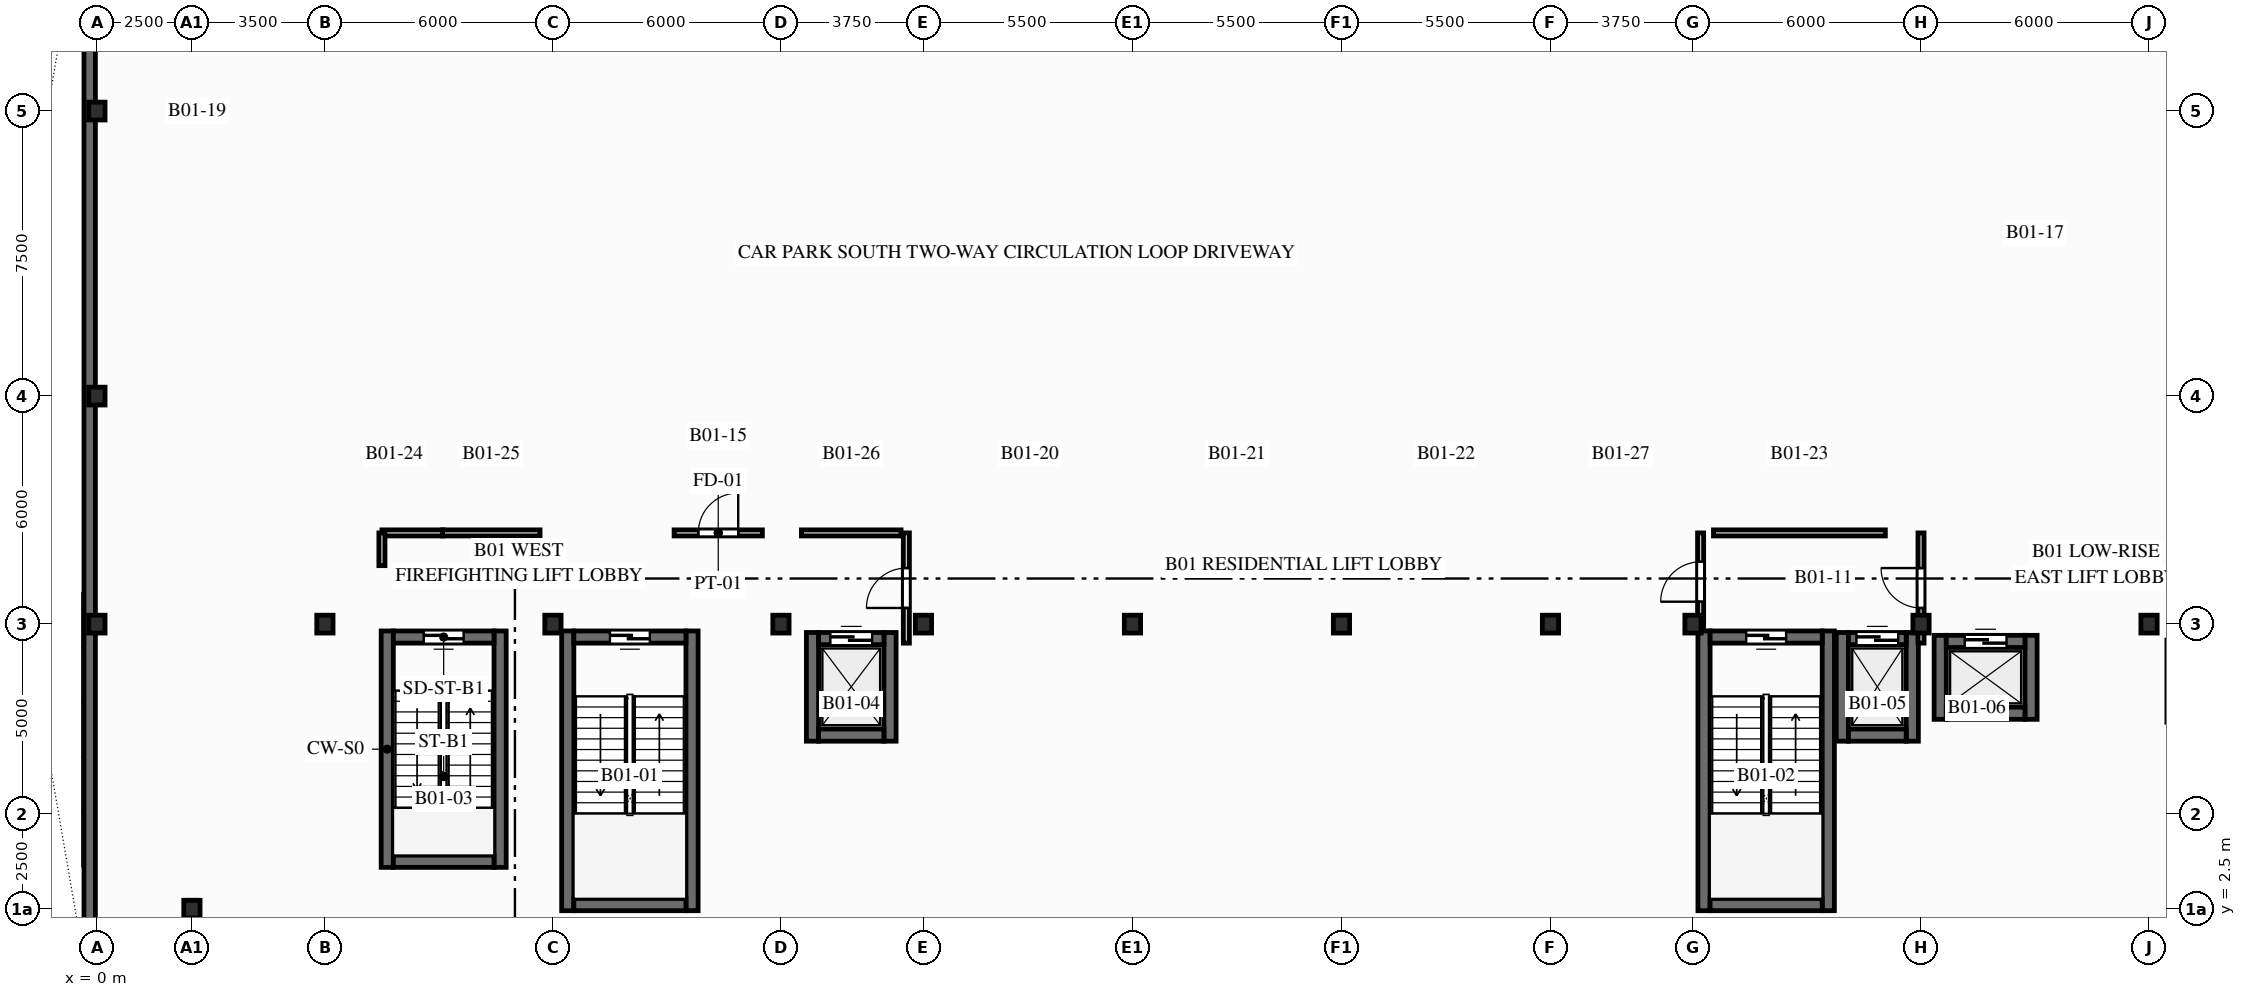
"""IFC4 building model, lengths in metres.
Left out: names, types, materials, properties, quantities, classifications, styles, units other than length and angle.
Written with IfcOpenShell. Run it as: python <this file> out.ifc"""

import sys

from ifc_helpers import new_model, si_unit, direction, frame, frame_2d, origin, origin_2d, place, context, subcontext, project, spatial, rectangle, i_section, extrude, element, fill, save


model = new_model("IFC4")
c1 = context("Model", 3, precision=1e-05, world=origin(), true_north=direction((0.0, 1.0)))
c2 = subcontext(c1, "Body", "Model", "MODEL_VIEW")
j1 = project(units=[si_unit("LENGTHUNIT", "METRE"), si_unit("PLANEANGLEUNIT", "RADIAN")], contexts=[c1])
p1 = place(None, origin())
s1 = spatial("IfcSite", under=j1, at=p1, CompositionType="ELEMENT")
p2 = place(p1, origin())
s2 = spatial("IfcBuilding", under=s1, at=p2, CompositionType="ELEMENT")
p3 = place(p2, frame((0.0, 0.0, -4.2)))
s3 = spatial("IfcBuildingStorey", under=s2, at=p3, CompositionType="ELEMENT", Elevation=-4.2)
for number, where, z_axis, x_axis in (
    (1, (0.0, 10.0, 0.0), (0.0, 0.0, 1.0), (1.0, 0.0, 0.0)),
    (2, (0.0, 16.0, 0.0), (0.0, 0.0, 1.0), (1.0, 0.0, 0.0)),
    (3, (0.0, 23.5, 0.0), (0.0, 0.0, 1.0), (1.0, 0.0, 0.0)),
    (4, (2.5, 2.5, 0.0), (0.0, 0.0, 1.0), (1.0, 0.0, 0.0)),
    (5, (6.0, 10.0, 0.0), (0.0, 0.0, 1.0), (1.0, 0.0, 0.0)),
    (6, (12.0, 10.0, 0.0), (0.0, 0.0, 1.0), (1.0, 0.0, 0.0)),
    (7, (18.0, 10.0, 0.0), (0.0, 0.0, 1.0), (1.0, 0.0, 0.0)),
    (8, (21.75, 10.0, 0.0), (0.0, 0.0, 1.0), (1.0, 0.0, 0.0)),
    (9, (27.25, 10.0, 0.0), (0.0, 0.0, 1.0), (1.0, 0.0, 0.0)),
    (10, (32.75, 10.0, 0.0), (0.0, 0.0, 1.0), (1.0, 0.0, 0.0)),
    (11, (38.25, 10.0, 0.0), (0.0, 0.0, 1.0), (1.0, 0.0, 0.0)),
    (12, (42.0, 10.0, 0.0), (0.0, 0.0, 1.0), (1.0, 0.0, 0.0)),
    (13, (48.0, 10.0, 0.0), (0.0, 0.0, 1.0), (1.0, 0.0, 0.0)),
    (14, (54.0, 10.0, 0.0), (0.0, 0.0, 1.0), (1.0, 0.0, 0.0)),
):
    element("IfcColumn", number, at=place(p3, frame(where, z_axis=z_axis, x_axis=x_axis)), inside=s3, PredefinedType="COLUMN", context=c2, shape_type="SweptSolid", body=[
        extrude(i_section(OverallWidth=0.428, OverallDepth=0.469, WebThickness=0.078, FlangeThickness=0.125, FilletRadius=0.015, at=origin_2d()), origin(), (0.0, 0.0, 1.0), 4.2),
    ])
p4 = place(p3, frame((-0.19, 1.2, 0.0), z_axis=(0.0, 0.0, 1.0), x_axis=(0.0, 1.0, 0.0)))
e15 = element("IfcWall", 15, at=p4, inside=s3, PredefinedType="SHEAR", context=c2, shape_type="SweptSolid", body=[
    extrude(rectangle(XDim=27.84, YDim=0.3, at=frame_2d((13.92, 0.0))), origin(), (0.0, 0.0, 1.0), 3.86),
])
for number, where, z_axis, x_axis in (
    (16, (12.39, 2.46, 0.0), (0.0, 0.0, 1.0), (0.0, 1.0, 0.0)),
    (17, (15.66, 2.46, 0.0), (0.0, 0.0, 1.0), (0.0, 1.0, 0.0)),
):
    element("IfcWall", number, at=place(p3, frame(where, z_axis=z_axis, x_axis=x_axis)), inside=s3, PredefinedType="SHEAR", context=c2, shape_type="SweptSolid", body=[
        extrude(rectangle(XDim=7.36, YDim=0.32, at=frame_2d((3.68, 0.0))), origin(), (0.0, 0.0, 1.0), 3.86),
    ])
p5 = place(p3, frame((12.55, 2.62, 0.0), z_axis=(0.0, 0.0, 1.0), x_axis=(1.0, 0.0, 0.0)))
e18 = element("IfcWall", 18, at=p5, inside=s3, PredefinedType="SHEAR", context=c2, shape_type="SweptSolid", body=[
    extrude(rectangle(XDim=2.95, YDim=0.32, at=frame_2d((1.475, 0.0))), origin(), (0.0, 0.0, 1.0), 3.86),
])
p6 = place(p3, frame((15.5, 9.66, 0.0), z_axis=(0.0, 0.0, 1.0), x_axis=(-1.0, 0.0, 0.0)))
e19 = element("IfcWall", 19, at=p6, inside=s3, PredefinedType="SHEAR", context=c2, shape_type="SweptSolid", body=[
    extrude(rectangle(XDim=2.95, YDim=0.32, at=frame_2d((1.475, 0.0))), origin(), (0.0, 0.0, 1.0), 3.86),
])
p7 = place(p6, frame((0.95, 0.0, 0.0)))
e20 = element("IfcOpeningElement", 20, at=p7, cuts=e19, PredefinedType="OPENING", context=c2, shape_type="SweptSolid", body=[
    extrude(rectangle(XDim=1.05, YDim=2.06, at=frame_2d((0.525, 1.03))), frame((0.0, 0.17, 0.0), z_axis=(0.0, -1.0, 0.0), x_axis=(1.0, 0.0, 0.0)), (0.0, 0.0, 1.0), 0.34),
])
for number, where, z_axis, x_axis in (
    (21, (42.29, 2.46, 0.0), (0.0, 0.0, 1.0), (0.0, 1.0, 0.0)),
    (22, (45.56, 2.46, 0.0), (0.0, 0.0, 1.0), (0.0, 1.0, 0.0)),
):
    element("IfcWall", number, at=place(p3, frame(where, z_axis=z_axis, x_axis=x_axis)), inside=s3, PredefinedType="SHEAR", context=c2, shape_type="SweptSolid", body=[
        extrude(rectangle(XDim=7.36, YDim=0.32, at=frame_2d((3.68, 0.0))), origin(), (0.0, 0.0, 1.0), 3.86),
    ])
p8 = place(p3, frame((42.45, 2.62, 0.0), z_axis=(0.0, 0.0, 1.0), x_axis=(1.0, 0.0, 0.0)))
e23 = element("IfcWall", 23, at=p8, inside=s3, PredefinedType="SHEAR", context=c2, shape_type="SweptSolid", body=[
    extrude(rectangle(XDim=2.95, YDim=0.32, at=frame_2d((1.475, 0.0))), origin(), (0.0, 0.0, 1.0), 3.86),
])
p9 = place(p3, frame((45.4, 9.66, 0.0), z_axis=(0.0, 0.0, 1.0), x_axis=(-1.0, 0.0, 0.0)))
e24 = element("IfcWall", 24, at=p9, inside=s3, PredefinedType="SHEAR", context=c2, shape_type="SweptSolid", body=[
    extrude(rectangle(XDim=2.95, YDim=0.32, at=frame_2d((1.475, 0.0))), origin(), (0.0, 0.0, 1.0), 3.86),
])
p10 = place(p9, frame((0.95, 0.0, 0.0)))
e25 = element("IfcOpeningElement", 25, at=p10, cuts=e24, PredefinedType="OPENING", context=c2, shape_type="SweptSolid", body=[
    extrude(rectangle(XDim=1.05, YDim=2.06, at=frame_2d((0.525, 1.03))), frame((0.0, 0.17, 0.0), z_axis=(0.0, -1.0, 0.0), x_axis=(1.0, 0.0, 0.0)), (0.0, 0.0, 1.0), 0.34),
])
for number, where, z_axis, x_axis in (
    (26, (7.64, 3.6, 0.0), (0.0, 0.0, 1.0), (0.0, 1.0, 0.0)),
    (27, (10.61, 3.6, 0.0), (0.0, 0.0, 1.0), (0.0, 1.0, 0.0)),
):
    element("IfcWall", number, at=place(p3, frame(where, z_axis=z_axis, x_axis=x_axis)), inside=s3, PredefinedType="SHEAR", context=c2, shape_type="SweptSolid", body=[
        extrude(rectangle(XDim=6.22, YDim=0.32, at=frame_2d((3.11, 0.0))), origin(), (0.0, 0.0, 1.0), 3.86),
    ])
p11 = place(p3, frame((7.8, 3.76, 0.0), z_axis=(0.0, 0.0, 1.0), x_axis=(1.0, 0.0, 0.0)))
e28 = element("IfcWall", 28, at=p11, inside=s3, PredefinedType="SHEAR", context=c2, shape_type="SweptSolid", body=[
    extrude(rectangle(XDim=2.65, YDim=0.32, at=frame_2d((1.325, 0.0))), origin(), (0.0, 0.0, 1.0), 3.86),
])
p12 = place(p3, frame((10.45, 9.66, 0.0), z_axis=(0.0, 0.0, 1.0), x_axis=(-1.0, 0.0, 0.0)))
e29 = element("IfcWall", 29, at=p12, inside=s3, PredefinedType="SHEAR", context=c2, shape_type="SweptSolid", body=[
    extrude(rectangle(XDim=2.65, YDim=0.32, at=frame_2d((1.325, 0.0))), origin(), (0.0, 0.0, 1.0), 3.86),
])
p13 = place(p12, frame((0.8, 0.0, 0.0)))
e30 = element("IfcOpeningElement", 30, at=p13, cuts=e29, PredefinedType="OPENING", context=c2, shape_type="SweptSolid", body=[
    extrude(rectangle(XDim=1.05, YDim=2.06, at=frame_2d((0.525, 1.03))), frame((0.0, 0.17, 0.0), z_axis=(0.0, -1.0, 0.0), x_axis=(1.0, 0.0, 0.0)), (0.0, 0.0, 1.0), 0.34),
])
for number, where, z_axis, x_axis in (
    (31, (18.83, 6.92, 0.0), (0.0, 0.0, 1.0), (0.0, 1.0, 0.0)),
    (32, (20.87, 6.92, 0.0), (0.0, 0.0, 1.0), (0.0, 1.0, 0.0)),
):
    element("IfcWall", number, at=place(p3, frame(where, z_axis=z_axis, x_axis=x_axis)), inside=s3, PredefinedType="SHEAR", context=c2, shape_type="SweptSolid", body=[
        extrude(rectangle(XDim=2.86, YDim=0.32, at=frame_2d((1.43, 0.0))), origin(), (0.0, 0.0, 1.0), 3.86),
    ])
p14 = place(p3, frame((18.99, 7.08, 0.0), z_axis=(0.0, 0.0, 1.0), x_axis=(1.0, 0.0, 0.0)))
e33 = element("IfcWall", 33, at=p14, inside=s3, PredefinedType="SHEAR", context=c2, shape_type="SweptSolid", body=[
    extrude(rectangle(XDim=1.72, YDim=0.32, at=frame_2d((0.86, 0.0))), origin(), (0.0, 0.0, 1.0), 3.86),
])
p15 = place(p3, frame((18.99, 9.62, 0.0), z_axis=(0.0, 0.0, 1.0), x_axis=(1.0, 0.0, 0.0)))
e34 = element("IfcWall", 34, at=p15, inside=s3, PredefinedType="SHEAR", context=c2, shape_type="SweptSolid", body=[
    extrude(rectangle(XDim=1.72, YDim=0.32, at=frame_2d((0.86, 0.0))), origin(), (0.0, 0.0, 1.0), 3.86),
])
p16 = place(p15, frame((0.31, 0.0, 0.0)))
e35 = element("IfcOpeningElement", 35, at=p16, cuts=e34, PredefinedType="OPENING", context=c2, shape_type="SweptSolid", body=[
    extrude(rectangle(XDim=1.1, YDim=2.06, at=frame_2d((0.55, 1.03))), frame((0.0, 0.17, 0.0), z_axis=(0.0, -1.0, 0.0), x_axis=(1.0, 0.0, 0.0)), (0.0, 0.0, 1.0), 0.34),
])
for number, where, z_axis, x_axis in (
    (36, (45.93, 6.92, 0.0), (0.0, 0.0, 1.0), (0.0, 1.0, 0.0)),
    (37, (47.77, 6.92, 0.0), (0.0, 0.0, 1.0), (0.0, 1.0, 0.0)),
):
    element("IfcWall", number, at=place(p3, frame(where, z_axis=z_axis, x_axis=x_axis)), inside=s3, PredefinedType="SHEAR", context=c2, shape_type="SweptSolid", body=[
        extrude(rectangle(XDim=2.86, YDim=0.32, at=frame_2d((1.43, 0.0))), origin(), (0.0, 0.0, 1.0), 3.86),
    ])
p17 = place(p3, frame((46.09, 7.08, 0.0), z_axis=(0.0, 0.0, 1.0), x_axis=(1.0, 0.0, 0.0)))
e38 = element("IfcWall", 38, at=p17, inside=s3, PredefinedType="SHEAR", context=c2, shape_type="SweptSolid", body=[
    extrude(rectangle(XDim=1.52, YDim=0.32, at=frame_2d((0.76, 0.0))), origin(), (0.0, 0.0, 1.0), 3.86),
])
p18 = place(p3, frame((46.09, 9.62, 0.0), z_axis=(0.0, 0.0, 1.0), x_axis=(1.0, 0.0, 0.0)))
e39 = element("IfcWall", 39, at=p18, inside=s3, PredefinedType="SHEAR", context=c2, shape_type="SweptSolid", body=[
    extrude(rectangle(XDim=1.52, YDim=0.32, at=frame_2d((0.76, 0.0))), origin(), (0.0, 0.0, 1.0), 3.86),
])
p19 = place(p18, frame((0.21, 0.0, 0.0)))
e40 = element("IfcOpeningElement", 40, at=p19, cuts=e39, PredefinedType="OPENING", context=c2, shape_type="SweptSolid", body=[
    extrude(rectangle(XDim=1.1, YDim=2.06, at=frame_2d((0.55, 1.03))), frame((0.0, 0.17, 0.0), z_axis=(0.0, -1.0, 0.0), x_axis=(1.0, 0.0, 0.0)), (0.0, 0.0, 1.0), 0.34),
])
for number, where, z_axis, x_axis in (
    (41, (48.505, 7.495, 0.0), (0.0, 0.0, 1.0), (0.0, 1.0, 0.0)),
    (42, (50.895, 7.495, 0.0), (0.0, 0.0, 1.0), (0.0, 1.0, 0.0)),
):
    element("IfcWall", number, at=place(p3, frame(where, z_axis=z_axis, x_axis=x_axis)), inside=s3, PredefinedType="SHEAR", context=c2, shape_type="SweptSolid", body=[
        extrude(rectangle(XDim=2.21, YDim=0.32, at=frame_2d((1.105, 0.0))), origin(), (0.0, 0.0, 1.0), 3.86),
    ])
p20 = place(p3, frame((48.665, 7.655, 0.0), z_axis=(0.0, 0.0, 1.0), x_axis=(1.0, 0.0, 0.0)))
e43 = element("IfcWall", 43, at=p20, inside=s3, PredefinedType="SHEAR", context=c2, shape_type="SweptSolid", body=[
    extrude(rectangle(XDim=2.07, YDim=0.32, at=frame_2d((1.035, 0.0))), origin(), (0.0, 0.0, 1.0), 3.86),
])
p21 = place(p3, frame((48.665, 9.545, 0.0), z_axis=(0.0, 0.0, 1.0), x_axis=(1.0, 0.0, 0.0)))
e44 = element("IfcWall", 44, at=p21, inside=s3, PredefinedType="SHEAR", context=c2, shape_type="SweptSolid", body=[
    extrude(rectangle(XDim=2.07, YDim=0.32, at=frame_2d((1.035, 0.0))), origin(), (0.0, 0.0, 1.0), 3.86),
])
p22 = place(p21, frame((0.485, 0.0, 0.0)))
e45 = element("IfcOpeningElement", 45, at=p22, cuts=e44, PredefinedType="OPENING", context=c2, shape_type="SweptSolid", body=[
    extrude(rectangle(XDim=1.1, YDim=2.06, at=frame_2d((0.55, 1.03))), frame((0.0, 0.17, 0.0), z_axis=(0.0, -1.0, 0.0), x_axis=(1.0, 0.0, 0.0)), (0.0, 0.0, 1.0), 0.34),
])
p23 = place(p3, frame((21.3, 9.5, 0.0), z_axis=(0.0, 0.0, 1.0), x_axis=(0.0, 1.0, 0.0)))
e46 = element("IfcWall", 46, at=p23, inside=s3, PredefinedType="PARTITIONING", context=c2, shape_type="SweptSolid", body=[
    extrude(rectangle(XDim=2.9, YDim=0.16, at=frame_2d((1.45, 0.0))), origin(), (0.0, 0.0, 1.0), 2.908),
])
p24 = place(p23, frame((0.925, 0.0, 0.0)))
e47 = element("IfcOpeningElement", 47, at=p24, cuts=e46, PredefinedType="OPENING", context=c2, shape_type="SweptSolid", body=[
    extrude(rectangle(XDim=1.05, YDim=2.06, at=frame_2d((0.525, 1.03))), frame((0.0, 0.09, 0.0), z_axis=(0.0, -1.0, 0.0), x_axis=(1.0, 0.0, 0.0)), (0.0, 0.0, 1.0), 0.18),
])
p25 = place(p3, frame((15.189, 12.4, 0.0), z_axis=(0.0, 0.0, 1.0), x_axis=(1.0, 0.0, 0.0)))
e48 = element("IfcWall", 48, at=p25, inside=s3, PredefinedType="PARTITIONING", context=c2, shape_type="SweptSolid", body=[
    extrude(rectangle(XDim=2.323, YDim=0.16, at=frame_2d((1.161, 0.0))), origin(), (0.0, 0.0, 1.0), 3.86),
])
p26 = place(p25, frame((0.636, 0.0, 0.0)))
e49 = element("IfcOpeningElement", 49, at=p26, cuts=e48, PredefinedType="OPENING", context=c2, shape_type="SweptSolid", body=[
    extrude(rectangle(XDim=1.05, YDim=2.06, at=frame_2d((0.525, 1.03))), frame((0.0, 0.09, 0.0), z_axis=(0.0, -1.0, 0.0), x_axis=(1.0, 0.0, 0.0)), (0.0, 0.0, 1.0), 0.18),
])
p27 = place(p3, frame((7.5, 12.4, 0.0), z_axis=(0.0, 0.0, 1.0), x_axis=(1.0, 0.0, 0.0)))
e50 = element("IfcWall", 50, at=p27, inside=s3, PredefinedType="PARTITIONING", context=c2, shape_type="SweptSolid", body=[
    extrude(rectangle(XDim=1.611, YDim=0.16, at=frame_2d((0.806, 0.0))), origin(), (0.0, 0.0, 1.0), 3.86),
])
p28 = place(p3, frame((7.5, 11.539, 0.0), z_axis=(0.0, 0.0, 1.0), x_axis=(0.0, 1.0, 0.0)))
e51 = element("IfcWall", 51, at=p28, inside=s3, PredefinedType="PARTITIONING", context=c2, shape_type="SweptSolid", body=[
    extrude(rectangle(XDim=0.861, YDim=0.16, at=frame_2d((0.431, 0.0))), origin(), (0.0, 0.0, 1.0), 3.86),
])
p29 = place(p3, frame((9.093, 12.4, 0.0), z_axis=(0.0, 0.0, 1.0), x_axis=(1.0, 0.0, 0.0)))
e52 = element("IfcWall", 52, at=p29, inside=s3, PredefinedType="PARTITIONING", context=c2, shape_type="SweptSolid", body=[
    extrude(rectangle(XDim=2.569, YDim=0.16, at=frame_2d((1.284, 0.0))), origin(), (0.0, 0.0, 1.0), 3.86),
])
p30 = place(p3, frame((18.539, 12.4, 0.0), z_axis=(0.0, 0.0, 1.0), x_axis=(1.0, 0.0, 0.0)))
e53 = element("IfcWall", 53, at=p30, inside=s3, PredefinedType="PARTITIONING", context=c2, shape_type="SweptSolid", body=[
    extrude(rectangle(XDim=2.623, YDim=0.16, at=frame_2d((1.311, 0.0))), origin(), (0.0, 0.0, 1.0), 3.86),
])
p31 = place(p3, frame((42.2, 9.83, 0.0), z_axis=(0.0, 0.0, 1.0), x_axis=(0.0, 1.0, 0.0)))
e54 = element("IfcWall", 54, at=p31, inside=s3, PredefinedType="PARTITIONING", context=c2, shape_type="SweptSolid", body=[
    extrude(rectangle(XDim=2.57, YDim=0.16, at=frame_2d((1.285, 0.0))), origin(), (0.0, 0.0, 1.0), 2.908),
])
p32 = place(p31, frame((0.76, 0.0, 0.0)))
e55 = element("IfcOpeningElement", 55, at=p32, cuts=e54, PredefinedType="OPENING", context=c2, shape_type="SweptSolid", body=[
    extrude(rectangle(XDim=1.05, YDim=2.06, at=frame_2d((0.525, 1.03))), frame((0.0, 0.09, 0.0), z_axis=(0.0, -1.0, 0.0), x_axis=(1.0, 0.0, 0.0)), (0.0, 0.0, 1.0), 0.18),
])
p33 = place(p3, frame((48.0, 9.5, 0.0), z_axis=(0.0, 0.0, 1.0), x_axis=(0.0, 1.0, 0.0)))
e56 = element("IfcWall", 56, at=p33, inside=s3, PredefinedType="PARTITIONING", context=c2, shape_type="SweptSolid", body=[
    extrude(rectangle(XDim=2.9, YDim=0.16, at=frame_2d((1.45, 0.0))), origin(), (0.0, 0.0, 1.0), 2.908),
])
p34 = place(p33, frame((0.925, 0.0, 0.0)))
e57 = element("IfcOpeningElement", 57, at=p34, cuts=e56, PredefinedType="OPENING", context=c2, shape_type="SweptSolid", body=[
    extrude(rectangle(XDim=1.05, YDim=2.06, at=frame_2d((0.525, 1.03))), frame((0.0, 0.09, 0.0), z_axis=(0.0, -1.0, 0.0), x_axis=(1.0, 0.0, 0.0)), (0.0, 0.0, 1.0), 0.18),
])
p35 = place(p3, frame((42.539, 12.4, 0.0), z_axis=(0.0, 0.0, 1.0), x_axis=(1.0, 0.0, 0.0)))
e58 = element("IfcWall", 58, at=p35, inside=s3, PredefinedType="PARTITIONING", context=c2, shape_type="SweptSolid", body=[
    extrude(rectangle(XDim=4.522, YDim=0.16, at=frame_2d((2.261, 0.0))), origin(), (0.0, 0.0, 1.0), 3.86),
])
p36 = place(p7, origin())
e59 = element("IfcDoor", 59, at=p36, inside=s3, OperationType="SINGLE_SWING_LEFT", PredefinedType="DOOR", context=c2, shape_type="SweptSolid", body=[
    extrude(rectangle(XDim=1.05, YDim=2.06, at=frame_2d((0.525, 1.03))), frame((0.0, 0.025, 0.0), z_axis=(0.0, -1.0, 0.0), x_axis=(1.0, 0.0, 0.0)), (0.0, 0.0, 1.0), 0.05),
])
fill(e20, e59)
p37 = place(p10, origin())
e60 = element("IfcDoor", 60, at=p37, inside=s3, OperationType="SINGLE_SWING_RIGHT", PredefinedType="DOOR", context=c2, shape_type="SweptSolid", body=[
    extrude(rectangle(XDim=1.05, YDim=2.06, at=frame_2d((0.525, 1.03))), frame((0.0, 0.025, 0.0), z_axis=(0.0, -1.0, 0.0), x_axis=(1.0, 0.0, 0.0)), (0.0, 0.0, 1.0), 0.05),
])
fill(e25, e60)
p38 = place(p13, origin())
e61 = element("IfcDoor", 61, at=p38, inside=s3, OperationType="SINGLE_SWING_LEFT", PredefinedType="DOOR", context=c2, shape_type="SweptSolid", body=[
    extrude(rectangle(XDim=1.05, YDim=2.06, at=frame_2d((0.525, 1.03))), frame((0.0, 0.025, 0.0), z_axis=(0.0, -1.0, 0.0), x_axis=(1.0, 0.0, 0.0)), (0.0, 0.0, 1.0), 0.05),
])
fill(e30, e61)
p39 = place(p16, origin())
e62 = element("IfcDoor", 62, at=p39, inside=s3, OperationType="SLIDING_TO_LEFT", PredefinedType="DOOR", context=c2, shape_type="SweptSolid", body=[
    extrude(rectangle(XDim=1.1, YDim=2.06, at=frame_2d((0.55, 1.03))), frame((0.0, 0.025, 0.0), z_axis=(0.0, -1.0, 0.0), x_axis=(1.0, 0.0, 0.0)), (0.0, 0.0, 1.0), 0.05),
])
fill(e35, e62)
p40 = place(p19, origin())
e63 = element("IfcDoor", 63, at=p40, inside=s3, OperationType="SLIDING_TO_RIGHT", PredefinedType="DOOR", context=c2, shape_type="SweptSolid", body=[
    extrude(rectangle(XDim=1.1, YDim=2.06, at=frame_2d((0.55, 1.03))), frame((0.0, 0.025, 0.0), z_axis=(0.0, -1.0, 0.0), x_axis=(1.0, 0.0, 0.0)), (0.0, 0.0, 1.0), 0.05),
])
fill(e40, e63)
p41 = place(p22, origin())
e64 = element("IfcDoor", 64, at=p41, inside=s3, OperationType="SLIDING_TO_LEFT", PredefinedType="DOOR", context=c2, shape_type="SweptSolid", body=[
    extrude(rectangle(XDim=1.1, YDim=2.06, at=frame_2d((0.55, 1.03))), frame((0.0, 0.025, 0.0), z_axis=(0.0, -1.0, 0.0), x_axis=(1.0, 0.0, 0.0)), (0.0, 0.0, 1.0), 0.05),
])
fill(e45, e64)
p42 = place(p24, origin())
e65 = element("IfcDoor", 65, at=p42, inside=s3, OperationType="SINGLE_SWING_LEFT", PredefinedType="DOOR", context=c2, shape_type="SweptSolid", body=[
    extrude(rectangle(XDim=1.05, YDim=2.06, at=frame_2d((0.525, 1.03))), frame((0.0, 0.025, 0.0), z_axis=(0.0, -1.0, 0.0), x_axis=(1.0, 0.0, 0.0)), (0.0, 0.0, 1.0), 0.05),
])
fill(e47, e65)
p43 = place(p26, origin())
e66 = element("IfcDoor", 66, at=p43, inside=s3, OperationType="SINGLE_SWING_RIGHT", PredefinedType="DOOR", context=c2, shape_type="SweptSolid", body=[
    extrude(rectangle(XDim=1.05, YDim=2.06, at=frame_2d((0.525, 1.03))), frame((0.0, 0.025, 0.0), z_axis=(0.0, -1.0, 0.0), x_axis=(1.0, 0.0, 0.0)), (0.0, 0.0, 1.0), 0.05),
])
fill(e49, e66)
p44 = place(p32, origin())
e67 = element("IfcDoor", 67, at=p44, inside=s3, OperationType="SINGLE_SWING_LEFT", PredefinedType="DOOR", context=c2, shape_type="SweptSolid", body=[
    extrude(rectangle(XDim=1.05, YDim=2.06, at=frame_2d((0.525, 1.03))), frame((0.0, 0.025, 0.0), z_axis=(0.0, -1.0, 0.0), x_axis=(1.0, 0.0, 0.0)), (0.0, 0.0, 1.0), 0.05),
])
fill(e55, e67)
p45 = place(p34, origin())
e68 = element("IfcDoor", 68, at=p45, inside=s3, OperationType="SINGLE_SWING_RIGHT", PredefinedType="DOOR", context=c2, shape_type="SweptSolid", body=[
    extrude(rectangle(XDim=1.05, YDim=2.06, at=frame_2d((0.525, 1.03))), frame((0.0, 0.025, 0.0), z_axis=(0.0, -1.0, 0.0), x_axis=(1.0, 0.0, 0.0)), (0.0, 0.0, 1.0), 0.05),
])
fill(e57, e68)
save(model, sys.argv[1])
